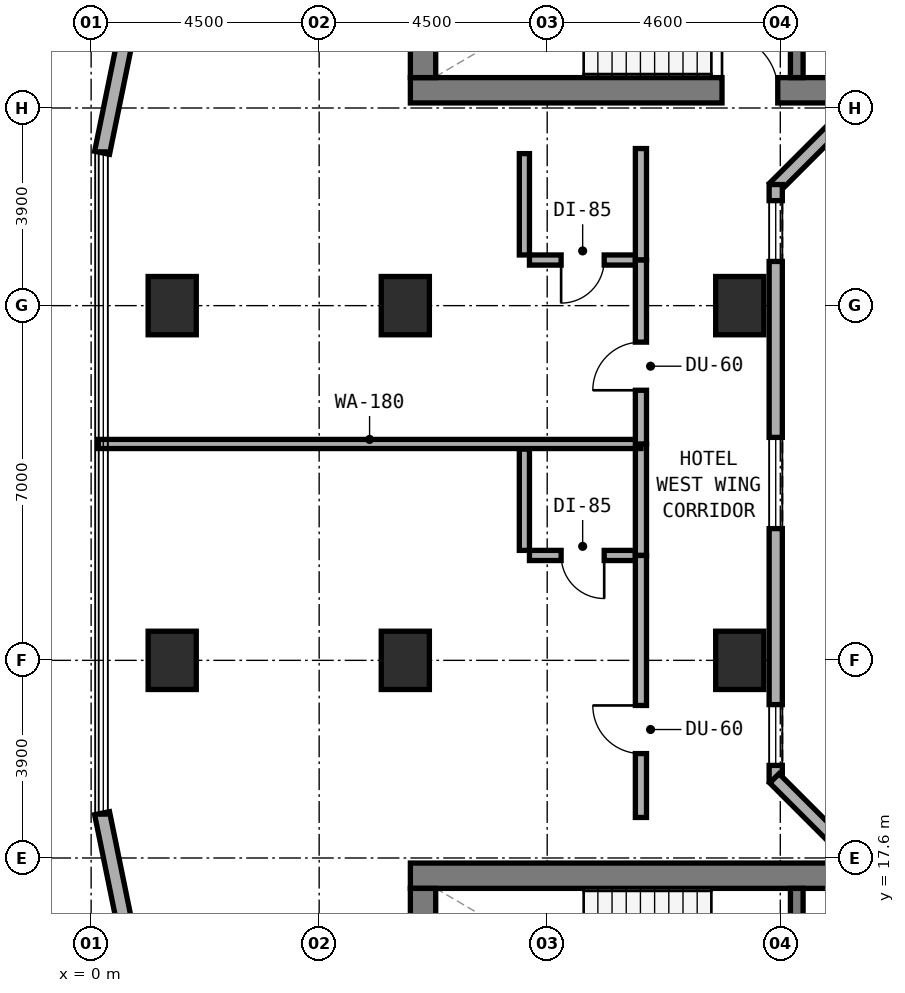
"""IFC4 building model, lengths in metres.
Left out: names, types, materials, properties, quantities, classifications, styles, units other than length and angle.
Written with IfcOpenShell. Run it as: python <this file> out.ifc"""

import sys

from ifc_helpers import new_model, si_unit, direction, frame, frame_2d, origin, origin_2d, place, context, subcontext, project, spatial, rectangle, extrude, element, fill, save


model = new_model("IFC4")
c1 = context("Model", 3, precision=1e-05, world=origin(), true_north=direction((0.0, 1.0)))
c2 = subcontext(c1, "Body", "Model", "MODEL_VIEW")
j1 = project(units=[si_unit("LENGTHUNIT", "METRE"), si_unit("PLANEANGLEUNIT", "RADIAN")], contexts=[c1])
p1 = place(None, origin())
s1 = spatial("IfcSite", under=j1, at=p1, CompositionType="ELEMENT")
p2 = place(p1, origin())
s2 = spatial("IfcBuilding", under=s1, at=p2, CompositionType="ELEMENT")
p3 = place(p2, frame((0.0, 0.0, 62.5)))
s3 = spatial("IfcBuildingStorey", under=s2, at=p3, CompositionType="ELEMENT", Elevation=62.5)
p4 = place(p3, frame((6.3, 32.75, 0.0), z_axis=(0.0, 0.0, 1.0), x_axis=(1.0, 0.0, 0.0)))
e1 = element("IfcWall", 1, at=p4, inside=s3, PredefinedType="SHEAR", context=c2, shape_type="SweptSolid", body=[
    extrude(rectangle(XDim=24.6, YDim=0.5, at=frame_2d((12.3, 0.0))), origin(), (0.0, 0.0, 1.0), 3.5),
])
p5 = place(p4, frame((6.15, 0.0, 0.0)))
e2 = element("IfcOpeningElement", 2, at=p5, cuts=e1, PredefinedType="OPENING", context=c2, shape_type="SweptSolid", body=[
    extrude(rectangle(XDim=1.1, YDim=2.15, at=frame_2d((0.55, 1.075))), frame((0.0, 0.26, 0.0), z_axis=(0.0, -1.0, 0.0), x_axis=(1.0, 0.0, 0.0)), (0.0, 0.0, 1.0), 0.52),
])
p6 = place(p3, frame((6.55, 33.0, 0.0), z_axis=(0.0, 0.0, 1.0), x_axis=(0.0, 1.0, 0.0)))
e3 = element("IfcWall", 3, at=p6, inside=s3, PredefinedType="SHEAR", context=c2, shape_type="SweptSolid", body=[
    extrude(rectangle(XDim=3.16, YDim=0.5, at=frame_2d((1.58, 0.0))), origin(), (0.0, 0.0, 1.0), 3.5),
])
p7 = place(p3, frame((13.925, 33.0, 0.0), z_axis=(0.0, 0.0, 1.0), x_axis=(0.0, 1.0, 0.0)))
e4 = element("IfcWall", 4, at=p7, inside=s3, PredefinedType="STANDARD", context=c2, shape_type="SweptSolid", body=[
    extrude(rectangle(XDim=3.16, YDim=0.25, at=frame_2d((1.58, 0.0))), origin(), (0.0, 0.0, 1.0), 3.22),
])
p8 = place(p7, frame((0.98, 0.0, 0.0)))
e5 = element("IfcOpeningElement", 5, at=p8, cuts=e4, PredefinedType="OPENING", context=c2, shape_type="SweptSolid", body=[
    extrude(rectangle(XDim=1.1, YDim=2.15, at=frame_2d((0.55, 1.075))), frame((0.0, 0.135, 0.0), z_axis=(0.0, -1.0, 0.0), x_axis=(1.0, 0.0, 0.0)), (0.0, 0.0, 1.0), 0.27),
])
p9 = place(p3, frame((6.3, 17.25, 0.0), z_axis=(0.0, 0.0, 1.0), x_axis=(1.0, 0.0, 0.0)))
e6 = element("IfcWall", 6, at=p9, inside=s3, PredefinedType="SHEAR", context=c2, shape_type="SweptSolid", body=[
    extrude(rectangle(XDim=24.6, YDim=0.5, at=frame_2d((12.3, 0.0))), origin(), (0.0, 0.0, 1.0), 3.5),
])
p10 = place(p3, frame((6.55, 13.84, 0.0), z_axis=(0.0, 0.0, 1.0), x_axis=(0.0, 1.0, 0.0)))
e7 = element("IfcWall", 7, at=p10, inside=s3, PredefinedType="SHEAR", context=c2, shape_type="SweptSolid", body=[
    extrude(rectangle(XDim=3.16, YDim=0.5, at=frame_2d((1.58, 0.0))), origin(), (0.0, 0.0, 1.0), 3.5),
])
p11 = place(p3, frame((13.925, 13.84, 0.0), z_axis=(0.0, 0.0, 1.0), x_axis=(0.0, 1.0, 0.0)))
e8 = element("IfcWall", 8, at=p11, inside=s3, PredefinedType="STANDARD", context=c2, shape_type="SweptSolid", body=[
    extrude(rectangle(XDim=3.16, YDim=0.25, at=frame_2d((1.58, 0.0))), origin(), (0.0, 0.0, 1.0), 3.22),
])
p12 = place(p11, frame((0.98, 0.0, 0.0)))
e9 = element("IfcOpeningElement", 9, at=p12, cuts=e8, PredefinedType="OPENING", context=c2, shape_type="SweptSolid", body=[
    extrude(rectangle(XDim=1.1, YDim=2.15, at=frame_2d((0.55, 1.075))), frame((0.0, 0.135, 0.0), z_axis=(0.0, -1.0, 0.0), x_axis=(1.0, 0.0, 0.0)), (0.0, 0.0, 1.0), 0.27),
])
for number, where, z_axis, x_axis in (
    (10, (6.2, 21.5, 0.0), (0.0, 0.0, 1.0), (1.0, 0.0, 0.0)),
    (11, (6.2, 28.5, 0.0), (0.0, 0.0, 1.0), (1.0, 0.0, 0.0)),
    (12, (12.8, 21.5, 0.0), (0.0, 0.0, 1.0), (1.0, 0.0, 0.0)),
    (13, (12.8, 28.5, 0.0), (0.0, 0.0, 1.0), (1.0, 0.0, 0.0)),
    (14, (1.6, 21.5, 0.0), (0.0, 0.0, 1.0), (1.0, 0.0, 0.0)),
    (15, (1.6, 28.5, 0.0), (0.0, 0.0, 1.0), (1.0, 0.0, 0.0)),
):
    element("IfcColumn", number, at=place(p3, frame(where, z_axis=z_axis, x_axis=x_axis)), inside=s3, PredefinedType="COLUMN", context=c2, shape_type="SweptSolid", body=[
        extrude(rectangle(XDim=0.95, YDim=1.15, at=origin_2d()), origin(), (0.0, 0.0, 1.0), 3.5),
    ])
p13 = place(p3, frame((2.229, 41.378, 0.0), z_axis=(0.0, 0.0, 1.0), x_axis=(-0.199990901713, -0.979797754249, 0.0)))
e16 = element("IfcWall", 16, at=p13, inside=s3, PredefinedType="STANDARD", context=c2, shape_type="SweptSolid", body=[
    extrude(rectangle(XDim=10.065, YDim=0.3, at=frame_2d((5.033, 0.0))), origin(), (0.0, 0.0, 1.0), 3.22),
])
p14 = place(p13, frame((0.378, 0.0, 0.85)))
e17 = element("IfcOpeningElement", 17, at=p14, cuts=e16, PredefinedType="OPENING", context=c2, shape_type="SweptSolid", body=[
    extrude(rectangle(XDim=1.8, YDim=1.5, at=frame_2d((0.9, 0.75))), frame((0.0, 0.16, 0.0), z_axis=(0.0, -1.0, 0.0), x_axis=(1.0, 0.0, 0.0)), (0.0, 0.0, 1.0), 0.32),
])
p15 = place(p13, frame((5.236, 0.0, 0.8)))
e18 = element("IfcOpeningElement", 18, at=p15, cuts=e16, PredefinedType="OPENING", context=c2, shape_type="SweptSolid", body=[
    extrude(rectangle(XDim=2.4, YDim=1.6, at=frame_2d((1.2, 0.8))), frame((0.0, 0.16, 0.0), z_axis=(0.0, -1.0, 0.0), x_axis=(1.0, 0.0, 0.0)), (0.0, 0.0, 1.0), 0.32),
])
p16 = place(p3, frame((0.216, 18.484, 0.0), z_axis=(0.0, 0.0, 1.0), x_axis=(0.199990901713, -0.979797754249, 0.0)))
e19 = element("IfcWall", 19, at=p16, inside=s3, PredefinedType="STANDARD", context=c2, shape_type="SweptSolid", body=[
    extrude(rectangle(XDim=10.065, YDim=0.3, at=frame_2d((5.033, 0.0))), origin(), (0.0, 0.0, 1.0), 3.22),
])
p17 = place(p16, frame((2.429, 0.0, 0.8)))
e20 = element("IfcOpeningElement", 20, at=p17, cuts=e19, PredefinedType="OPENING", context=c2, shape_type="SweptSolid", body=[
    extrude(rectangle(XDim=2.4, YDim=1.6, at=frame_2d((1.2, 0.8))), frame((0.0, 0.16, 0.0), z_axis=(0.0, -1.0, 0.0), x_axis=(1.0, 0.0, 0.0)), (0.0, 0.0, 1.0), 0.32),
])
p18 = place(p16, frame((7.887, 0.0, 0.85)))
e21 = element("IfcOpeningElement", 21, at=p18, cuts=e19, PredefinedType="OPENING", context=c2, shape_type="SweptSolid", body=[
    extrude(rectangle(XDim=1.8, YDim=1.5, at=frame_2d((0.9, 0.75))), frame((0.0, 0.16, 0.0), z_axis=(0.0, -1.0, 0.0), x_axis=(1.0, 0.0, 0.0)), (0.0, 0.0, 1.0), 0.32),
])
p19 = place(p3, frame((15.318, 32.662, 0.0), z_axis=(0.0, 0.0, 1.0), x_axis=(-0.707106781187, -0.707106781187, 0.0)))
e22 = element("IfcWall", 22, at=p19, inside=s3, PredefinedType="STANDARD", context=c2, shape_type="SweptSolid", body=[
    extrude(rectangle(XDim=2.594, YDim=0.26, at=frame_2d((1.297, 0.0))), origin(), (0.0, 0.0, 1.0), 3.22),
])
p20 = place(p3, frame((13.51, 30.89, 0.0), z_axis=(0.0, 0.0, 1.0), x_axis=(0.0, -1.0, 0.0)))
e23 = element("IfcWall", 23, at=p20, inside=s3, PredefinedType="STANDARD", context=c2, shape_type="SweptSolid", body=[
    extrude(rectangle(XDim=11.78, YDim=0.26, at=frame_2d((5.89, 0.0))), origin(), (0.0, 0.0, 1.0), 3.22),
])
p21 = place(p20, frame((0.318, 0.0, 0.85)))
e24 = element("IfcOpeningElement", 24, at=p21, cuts=e23, PredefinedType="OPENING", context=c2, shape_type="SweptSolid", body=[
    extrude(rectangle(XDim=1.2, YDim=1.5, at=frame_2d((0.6, 0.75))), frame((0.0, 0.14, 0.0), z_axis=(0.0, -1.0, 0.0), x_axis=(1.0, 0.0, 0.0)), (0.0, 0.0, 1.0), 0.28),
])
p22 = place(p20, frame((4.99, 0.0, 0.85)))
e25 = element("IfcOpeningElement", 25, at=p22, cuts=e23, PredefinedType="OPENING", context=c2, shape_type="SweptSolid", body=[
    extrude(rectangle(XDim=1.8, YDim=1.5, at=frame_2d((0.9, 0.75))), frame((0.0, 0.14, 0.0), z_axis=(0.0, -1.0, 0.0), x_axis=(1.0, 0.0, 0.0)), (0.0, 0.0, 1.0), 0.28),
])
p23 = place(p20, frame((10.263, 0.0, 0.85)))
e26 = element("IfcOpeningElement", 26, at=p23, cuts=e23, PredefinedType="OPENING", context=c2, shape_type="SweptSolid", body=[
    extrude(rectangle(XDim=1.2, YDim=1.5, at=frame_2d((0.6, 0.75))), frame((0.0, 0.14, 0.0), z_axis=(0.0, -1.0, 0.0), x_axis=(1.0, 0.0, 0.0)), (0.0, 0.0, 1.0), 0.28),
])
p24 = place(p3, frame((13.484, 19.172, 0.0), z_axis=(0.0, 0.0, 1.0), x_axis=(0.707106781187, -0.707106781187, 0.0)))
e27 = element("IfcWall", 27, at=p24, inside=s3, PredefinedType="STANDARD", context=c2, shape_type="SweptSolid", body=[
    extrude(rectangle(XDim=2.594, YDim=0.26, at=frame_2d((1.297, 0.0))), origin(), (0.0, 0.0, 1.0), 3.22),
])
p25 = place(p3, frame((8.65, 23.57, 0.0), z_axis=(0.0, 0.0, 1.0), x_axis=(1.0, 0.0, 0.0)))
e28 = element("IfcWall", 28, at=p25, inside=s3, PredefinedType="PLUMBINGWALL", context=c2, shape_type="SweptSolid", body=[
    extrude(rectangle(XDim=2.1, YDim=0.2, at=frame_2d((1.05, 0.0))), origin(), (0.0, 0.0, 1.0), 3.22),
])
p26 = place(p25, frame((0.625, 0.0, 0.0)))
e29 = element("IfcOpeningElement", 29, at=p26, cuts=e28, PredefinedType="OPENING", context=c2, shape_type="SweptSolid", body=[
    extrude(rectangle(XDim=0.85, YDim=2.1, at=frame_2d((0.425, 1.05))), frame((0.0, 0.11, 0.0), z_axis=(0.0, -1.0, 0.0), x_axis=(1.0, 0.0, 0.0)), (0.0, 0.0, 1.0), 0.22),
])
p27 = place(p3, frame((8.55, 23.67, 0.0), z_axis=(0.0, 0.0, 1.0), x_axis=(0.0, 1.0, 0.0)))
e30 = element("IfcWall", 30, at=p27, inside=s3, PredefinedType="PLUMBINGWALL", context=c2, shape_type="SweptSolid", body=[
    extrude(rectangle(XDim=2.0, YDim=0.2, at=frame_2d((1.0, 0.0))), origin(), (0.0, 0.0, 1.0), 3.22),
])
p28 = place(p3, frame((10.85, 23.57, 0.0), z_axis=(0.0, 0.0, 1.0), x_axis=(0.0, 1.0, 0.0)))
e31 = element("IfcWall", 31, at=p28, inside=s3, PredefinedType="SOLIDWALL", context=c2, shape_type="SweptSolid", body=[
    extrude(rectangle(XDim=2.2, YDim=0.22, at=frame_2d((1.1, 0.0))), origin(), (0.0, 0.0, 1.0), 3.22),
])
p29 = place(p3, frame((10.85, 18.4, 0.0), z_axis=(0.0, 0.0, 1.0), x_axis=(0.0, 1.0, 0.0)))
e32 = element("IfcWall", 32, at=p29, inside=s3, PredefinedType="SOLIDWALL", context=c2, shape_type="SweptSolid", body=[
    extrude(rectangle(XDim=5.17, YDim=0.22, at=frame_2d((2.585, 0.0))), origin(), (0.0, 0.0, 1.0), 2.495),
])
p30 = place(p29, frame((1.26, 0.0, 0.0)))
e33 = element("IfcOpeningElement", 33, at=p30, cuts=e32, PredefinedType="OPENING", context=c2, shape_type="SweptSolid", body=[
    extrude(rectangle(XDim=0.95, YDim=2.1, at=frame_2d((0.475, 1.05))), frame((0.0, 0.12, 0.0), z_axis=(0.0, -1.0, 0.0), x_axis=(1.0, 0.0, 0.0)), (0.0, 0.0, 1.0), 0.24),
])
p31 = place(p3, frame((0.14, 25.77, 0.0), z_axis=(0.0, 0.0, 1.0), x_axis=(1.0, 0.0, 0.0)))
e34 = element("IfcWall", 34, at=p31, inside=s3, PredefinedType="SOLIDWALL", context=c2, shape_type="SweptSolid", body=[
    extrude(rectangle(XDim=10.71, YDim=0.18, at=frame_2d((5.355, 0.0))), origin(), (0.0, 0.0, 1.0), 2.745),
])
p32 = place(p3, frame((8.65, 29.4, 0.0), z_axis=(0.0, 0.0, 1.0), x_axis=(1.0, 0.0, 0.0)))
e35 = element("IfcWall", 35, at=p32, inside=s3, PredefinedType="PLUMBINGWALL", context=c2, shape_type="SweptSolid", body=[
    extrude(rectangle(XDim=2.1, YDim=0.2, at=frame_2d((1.05, 0.0))), origin(), (0.0, 0.0, 1.0), 3.22),
])
p33 = place(p32, frame((0.625, 0.0, 0.0)))
e36 = element("IfcOpeningElement", 36, at=p33, cuts=e35, PredefinedType="OPENING", context=c2, shape_type="SweptSolid", body=[
    extrude(rectangle(XDim=0.85, YDim=2.1, at=frame_2d((0.425, 1.05))), frame((0.0, 0.11, 0.0), z_axis=(0.0, -1.0, 0.0), x_axis=(1.0, 0.0, 0.0)), (0.0, 0.0, 1.0), 0.22),
])
p34 = place(p3, frame((8.55, 29.5, 0.0), z_axis=(0.0, 0.0, 1.0), x_axis=(0.0, 1.0, 0.0)))
e37 = element("IfcWall", 37, at=p34, inside=s3, PredefinedType="PLUMBINGWALL", context=c2, shape_type="SweptSolid", body=[
    extrude(rectangle(XDim=2.0, YDim=0.2, at=frame_2d((1.0, 0.0))), origin(), (0.0, 0.0, 1.0), 3.22),
])
p35 = place(p3, frame((10.85, 29.4, 0.0), z_axis=(0.0, 0.0, 1.0), x_axis=(0.0, 1.0, 0.0)))
e38 = element("IfcWall", 38, at=p35, inside=s3, PredefinedType="SOLIDWALL", context=c2, shape_type="SweptSolid", body=[
    extrude(rectangle(XDim=2.2, YDim=0.22, at=frame_2d((1.1, 0.0))), origin(), (0.0, 0.0, 1.0), 3.22),
])
p36 = place(p3, frame((10.85, 25.77, 0.0), z_axis=(0.0, 0.0, 1.0), x_axis=(0.0, 1.0, 0.0)))
e39 = element("IfcWall", 39, at=p36, inside=s3, PredefinedType="SOLIDWALL", context=c2, shape_type="SweptSolid", body=[
    extrude(rectangle(XDim=3.63, YDim=0.22, at=frame_2d((1.815, 0.0))), origin(), (0.0, 0.0, 1.0), 2.495),
])
p37 = place(p36, frame((1.06, 0.0, 0.0)))
e40 = element("IfcOpeningElement", 40, at=p37, cuts=e39, PredefinedType="OPENING", context=c2, shape_type="SweptSolid", body=[
    extrude(rectangle(XDim=0.95, YDim=2.1, at=frame_2d((0.475, 1.05))), frame((0.0, 0.12, 0.0), z_axis=(0.0, -1.0, 0.0), x_axis=(1.0, 0.0, 0.0)), (0.0, 0.0, 1.0), 0.24),
])
p38 = place(p21, origin())
e41 = element("IfcWindow", 41, at=p38, inside=s3, PartitioningType="SINGLE_PANEL", PredefinedType="WINDOW", context=c2, shape_type="SweptSolid", body=[
    extrude(rectangle(XDim=1.2, YDim=1.5, at=frame_2d((0.6, 0.75))), frame((0.0, 0.03, 0.0), z_axis=(0.0, -1.0, 0.0), x_axis=(1.0, 0.0, 0.0)), (0.0, 0.0, 1.0), 0.06),
])
fill(e24, e41)
p39 = place(p22, origin())
e42 = element("IfcWindow", 42, at=p39, inside=s3, PartitioningType="SINGLE_PANEL", PredefinedType="WINDOW", context=c2, shape_type="SweptSolid", body=[
    extrude(rectangle(XDim=1.8, YDim=1.5, at=frame_2d((0.9, 0.75))), frame((0.0, 0.03, 0.0), z_axis=(0.0, -1.0, 0.0), x_axis=(1.0, 0.0, 0.0)), (0.0, 0.0, 1.0), 0.06),
])
fill(e25, e42)
p40 = place(p23, origin())
e43 = element("IfcWindow", 43, at=p40, inside=s3, PartitioningType="SINGLE_PANEL", PredefinedType="WINDOW", context=c2, shape_type="SweptSolid", body=[
    extrude(rectangle(XDim=1.2, YDim=1.5, at=frame_2d((0.6, 0.75))), frame((0.0, 0.03, 0.0), z_axis=(0.0, -1.0, 0.0), x_axis=(1.0, 0.0, 0.0)), (0.0, 0.0, 1.0), 0.06),
])
fill(e26, e43)
p41 = place(p5, origin())
e44 = element("IfcDoor", 44, at=p41, inside=s3, OperationType="SINGLE_SWING_LEFT", PredefinedType="DOOR", context=c2, shape_type="SweptSolid", body=[
    extrude(rectangle(XDim=1.1, YDim=2.15, at=frame_2d((0.55, 1.075))), frame((0.0, 0.025, 0.0), z_axis=(0.0, -1.0, 0.0), x_axis=(1.0, 0.0, 0.0)), (0.0, 0.0, 1.0), 0.05),
])
fill(e2, e44)
p42 = place(p26, frame((0.85, 0.0, 0.0), z_axis=(0.0, 0.0, 1.0), x_axis=(-1.0, 0.0, 0.0)))
e45 = element("IfcDoor", 45, at=p42, inside=s3, OperationType="SINGLE_SWING_LEFT", PredefinedType="DOOR", context=c2, shape_type="SweptSolid", body=[
    extrude(rectangle(XDim=0.85, YDim=2.1, at=frame_2d((0.425, 1.05))), frame((0.0, 0.025, 0.0), z_axis=(0.0, -1.0, 0.0), x_axis=(1.0, 0.0, 0.0)), (0.0, 0.0, 1.0), 0.05),
])
fill(e29, e45)
p43 = place(p30, origin())
e46 = element("IfcDoor", 46, at=p43, inside=s3, OperationType="SINGLE_SWING_RIGHT", PredefinedType="DOOR", context=c2, shape_type="SweptSolid", body=[
    extrude(rectangle(XDim=0.95, YDim=2.1, at=frame_2d((0.475, 1.05))), frame((0.0, 0.025, 0.0), z_axis=(0.0, -1.0, 0.0), x_axis=(1.0, 0.0, 0.0)), (0.0, 0.0, 1.0), 0.05),
])
fill(e33, e46)
p44 = place(p33, frame((0.85, 0.0, 0.0), z_axis=(0.0, 0.0, 1.0), x_axis=(-1.0, 0.0, 0.0)))
e47 = element("IfcDoor", 47, at=p44, inside=s3, OperationType="SINGLE_SWING_RIGHT", PredefinedType="DOOR", context=c2, shape_type="SweptSolid", body=[
    extrude(rectangle(XDim=0.85, YDim=2.1, at=frame_2d((0.425, 1.05))), frame((0.0, 0.025, 0.0), z_axis=(0.0, -1.0, 0.0), x_axis=(1.0, 0.0, 0.0)), (0.0, 0.0, 1.0), 0.05),
])
fill(e36, e47)
p45 = place(p37, origin())
e48 = element("IfcDoor", 48, at=p45, inside=s3, OperationType="SINGLE_SWING_LEFT", PredefinedType="DOOR", context=c2, shape_type="SweptSolid", body=[
    extrude(rectangle(XDim=0.95, YDim=2.1, at=frame_2d((0.475, 1.05))), frame((0.0, 0.025, 0.0), z_axis=(0.0, -1.0, 0.0), x_axis=(1.0, 0.0, 0.0)), (0.0, 0.0, 1.0), 0.05),
])
fill(e40, e48)
save(model, sys.argv[1])
